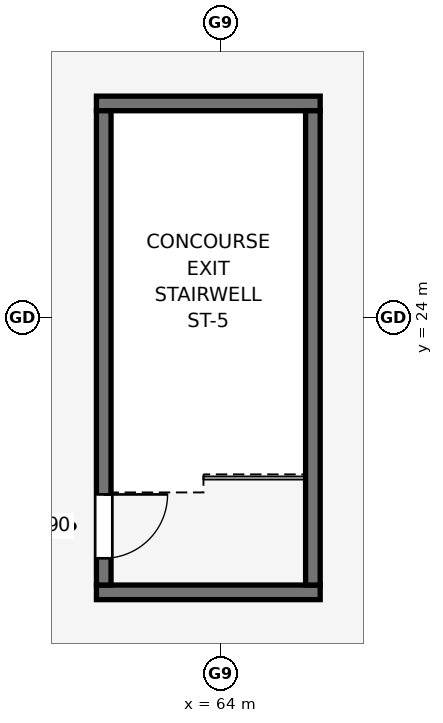
"""IFC4 building model, lengths in metres.
Left out: names, types, materials, properties, quantities, classifications, styles, units other than length and angle.
Written with IfcOpenShell. Run it as: python <this file> out.ifc"""

import sys

from ifc_helpers import new_model, si_unit, direction, frame, frame_2d, origin, place, context, subcontext, project, spatial, rectangle, extrude, element, fill, save


model = new_model("IFC4")
c1 = context("Model", 3, precision=1e-05, world=origin(), true_north=direction((0.0, 1.0)))
c2 = subcontext(c1, "Body", "Model", "MODEL_VIEW")
j1 = project(units=[si_unit("LENGTHUNIT", "METRE"), si_unit("PLANEANGLEUNIT", "RADIAN")], contexts=[c1])
p1 = place(None, origin())
s1 = spatial("IfcSite", under=j1, at=p1, CompositionType="ELEMENT")
p2 = place(p1, origin())
s2 = spatial("IfcBuilding", under=s1, at=p2, CompositionType="ELEMENT")
p3 = place(p2, frame((0.0, 0.0, 16.0)))
s3 = spatial("IfcBuildingStorey", under=s2, at=p3, CompositionType="ELEMENT", Elevation=16.0)
for number, where, z_axis, x_axis in (
    (1, (61.96, 19.48, 0.0), (0.0, 0.0, 1.0), (1.0, 0.0, 0.0)),
    (2, (65.64, 27.52, 0.0), (0.0, 0.0, 1.0), (-1.0, 0.0, 0.0)),
):
    element("IfcWall", number, at=place(p3, frame(where, z_axis=z_axis, x_axis=x_axis)), inside=s3, PredefinedType="SHEAR", context=c2, shape_type="SweptSolid", body=[
        extrude(rectangle(XDim=3.68, YDim=0.24, at=frame_2d((1.84, 0.0))), origin(), (0.0, 0.0, 1.0), 5.0),
    ])
p4 = place(p3, frame((62.08, 27.4, 0.0), z_axis=(0.0, 0.0, 1.0), x_axis=(0.0, -1.0, 0.0)))
e3 = element("IfcWall", 3, at=p4, inside=s3, PredefinedType="SHEAR", context=c2, shape_type="SweptSolid", body=[
    extrude(rectangle(XDim=7.8, YDim=0.24, at=frame_2d((3.9, 0.0))), origin(), (0.0, 0.0, 1.0), 5.0),
])
p5 = place(p4, frame((6.31, 0.0, 0.0)))
e4 = element("IfcOpeningElement", 4, at=p5, cuts=e3, PredefinedType="OPENING", context=c2, shape_type="SweptSolid", body=[
    extrude(rectangle(XDim=1.05, YDim=2.0, at=frame_2d((0.525, 1.0))), frame((0.0, 0.13, 0.0), z_axis=(0.0, -1.0, 0.0), x_axis=(1.0, 0.0, 0.0)), (0.0, 0.0, 1.0), 0.26),
])
p6 = place(p3, frame((65.52, 19.6, 0.0), z_axis=(0.0, 0.0, 1.0), x_axis=(0.0, 1.0, 0.0)))
e5 = element("IfcWall", 5, at=p6, inside=s3, PredefinedType="SHEAR", context=c2, shape_type="SweptSolid", body=[
    extrude(rectangle(XDim=7.8, YDim=0.24, at=frame_2d((3.9, 0.0))), origin(), (0.0, 0.0, 1.0), 5.0),
])
p7 = place(p5, origin())
e6 = element("IfcDoor", 6, at=p7, inside=s3, OperationType="SINGLE_SWING_LEFT", PredefinedType="DOOR", context=c2, shape_type="SweptSolid", body=[
    extrude(rectangle(XDim=1.05, YDim=2.0, at=frame_2d((0.525, 1.0))), frame((0.0, 0.025, 0.0), z_axis=(0.0, -1.0, 0.0), x_axis=(1.0, 0.0, 0.0)), (0.0, 0.0, 1.0), 0.05),
])
fill(e4, e6)
save(model, sys.argv[1])
